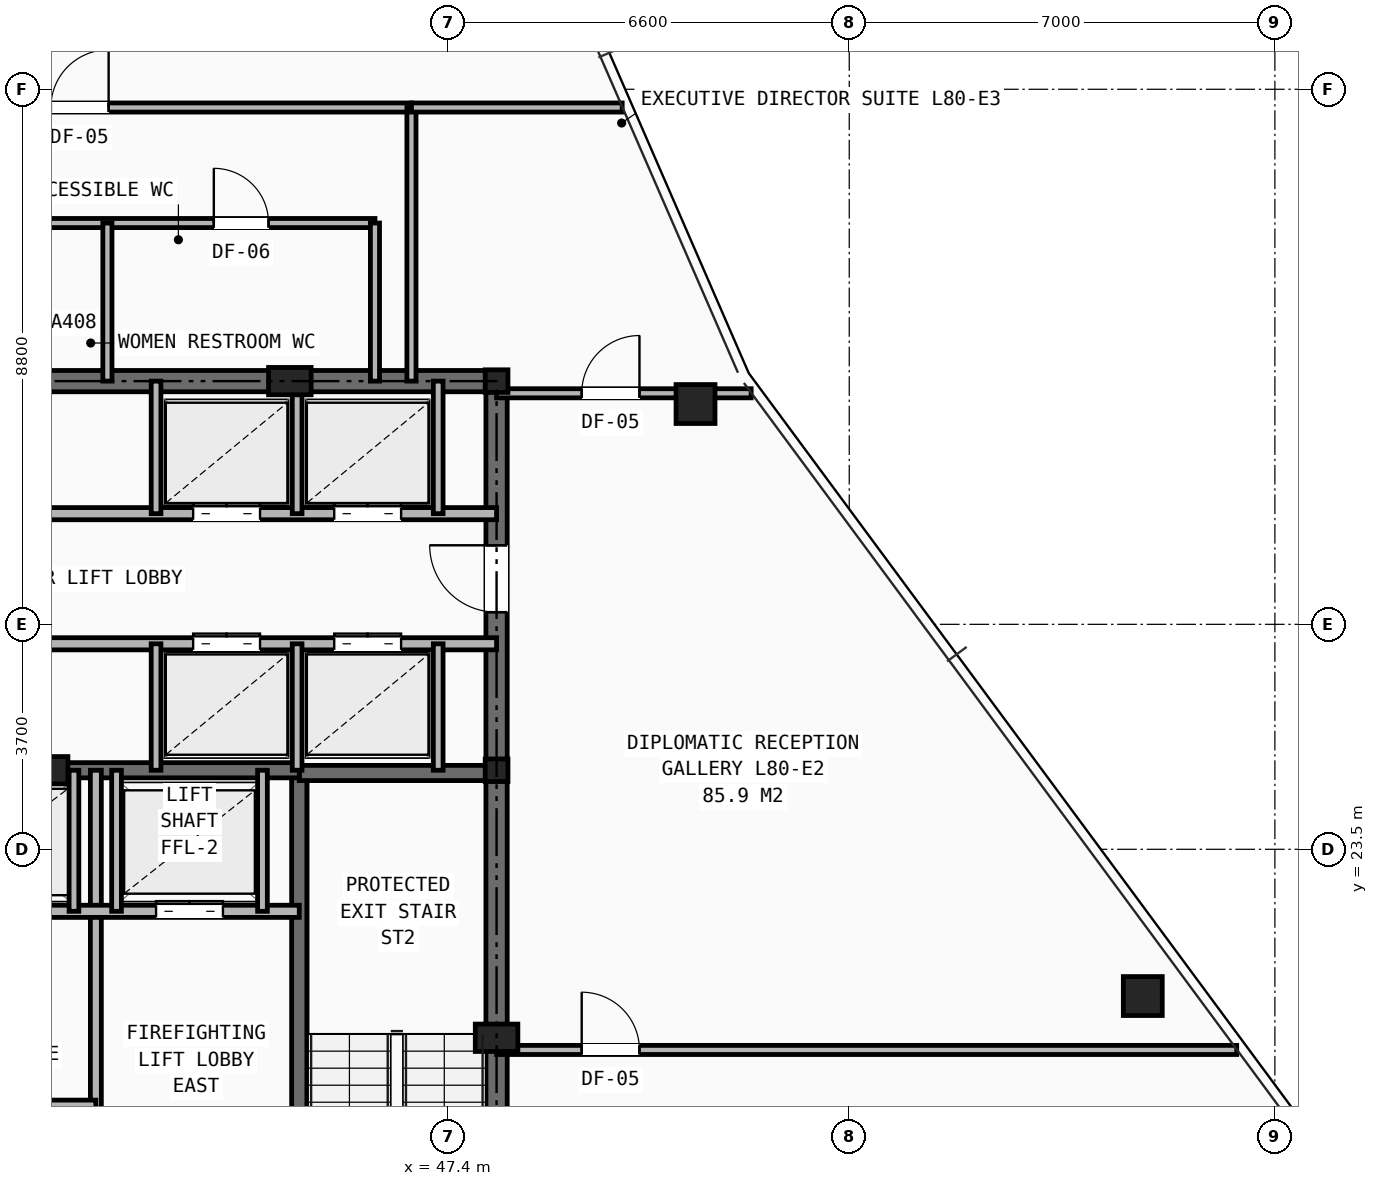
"""IFC4 building model, lengths in metres.
Left out: names, types, materials, properties, quantities, classifications, styles, units other than length and angle.
Written with IfcOpenShell. Run it as: python <this file> out.ifc"""

import sys

from ifc_helpers import new_model, si_unit, direction, frame, frame_2d, origin, origin_2d, place, context, subcontext, project, spatial, rectangle, hollow_rectangle, i_section, extrude, element, fill, save


model = new_model("IFC4")
c1 = context("Model", 3, precision=1e-05, world=origin(), true_north=direction((0.0, 1.0)))
c2 = subcontext(c1, "Body", "Model", "MODEL_VIEW")
j1 = project(units=[si_unit("LENGTHUNIT", "METRE"), si_unit("PLANEANGLEUNIT", "RADIAN")], contexts=[c1])
p1 = place(None, origin())
s1 = spatial("IfcSite", under=j1, at=p1, CompositionType="ELEMENT")
p2 = place(p1, origin())
s2 = spatial("IfcBuilding", under=s1, at=p2, CompositionType="ELEMENT")
p3 = place(p2, frame((0.0, 0.0, 283.0)))
s3 = spatial("IfcBuildingStorey", under=s2, at=p3, CompositionType="ELEMENT", Elevation=283.0)
for number, where, z_axis, x_axis in (
    (1, (48.2, 24.8, 0.0), (0.0, 0.0, 1.0), (1.0, 0.0, 0.0)),
    (2, (48.2, 31.2, 0.0), (0.0, 0.0, 1.0), (1.0, 0.0, 0.0)),
):
    element("IfcColumn", number, at=place(p3, frame(where, z_axis=z_axis, x_axis=x_axis)), inside=s3, PredefinedType="COLUMN", context=c2, shape_type="SweptSolid", body=[
        extrude(i_section(OverallWidth=0.374, OverallDepth=0.372, WebThickness=0.016, FlangeThickness=0.026, at=origin_2d()), origin(), (0.0, 0.0, 1.0), 3.5),
    ])
for number, where, z_axis, x_axis in (
    (3, (48.2, 20.4, 0.0), (0.0, 0.0, 1.0), (1.0, 0.0, 0.0)),
    (4, (44.8, 31.2, 0.0), (0.0, 0.0, 1.0), (1.0, 0.0, 0.0)),
    (5, (40.8, 24.8, 0.0), (0.0, 0.0, 1.0), (1.0, 0.0, 0.0)),
):
    element("IfcColumn", number, at=place(p3, frame(where, z_axis=z_axis, x_axis=x_axis)), inside=s3, PredefinedType="PILASTER", context=c2, shape_type="SweptSolid", body=[
        extrude(rectangle(XDim=0.7, YDim=0.45, at=origin_2d()), origin(), (0.0, 0.0, 1.0), 3.5),
    ])
for number, where, z_axis, x_axis in (
    (6, (58.827, 21.086, 0.0), (0.0, 0.0, 1.0), (1.0, 0.0, 0.0)),
    (7, (51.472, 30.823, 0.0), (0.0, 0.0, 1.0), (1.0, 0.0, 0.0)),
):
    element("IfcColumn", number, at=place(p3, frame(where, z_axis=z_axis, x_axis=x_axis)), inside=s3, PredefinedType="COLUMN", context=c2, shape_type="SweptSolid", body=[
        extrude(hollow_rectangle(XDim=0.64, YDim=0.64, WallThickness=0.045, at=origin_2d()), origin(), (0.0, 0.0, 1.0), 3.5),
    ])
p4 = place(p3, frame((31.8, 31.2, 0.0), z_axis=(0.0, 0.0, 1.0), x_axis=(1.0, 0.0, 0.0)))
e8 = element("IfcWall", 8, at=p4, inside=s3, PredefinedType="SHEAR", context=c2, shape_type="SweptSolid", body=[
    extrude(rectangle(XDim=16.4, YDim=0.35, at=frame_2d((8.2, 0.0))), origin(), (0.0, 0.0, 1.0), 3.25),
])
p5 = place(p3, frame((48.2, 16.4, 0.0), z_axis=(0.0, 0.0, 1.0), x_axis=(0.0, 1.0, 0.0)))
e9 = element("IfcWall", 9, at=p5, inside=s3, PredefinedType="SHEAR", context=c2, shape_type="SweptSolid", body=[
    extrude(rectangle(XDim=14.8, YDim=0.35, at=frame_2d((7.4, 0.0))), origin(), (0.0, 0.0, 1.0), 3.25),
])
p6 = place(p5, frame((11.0, 0.0, 0.0)))
e10 = element("IfcOpeningElement", 10, at=p6, cuts=e9, PredefinedType="OPENING", context=c2, shape_type="SweptSolid", body=[
    extrude(rectangle(XDim=1.1, YDim=2.15, at=frame_2d((0.55, 1.075))), frame((0.0, 0.185, 0.0), z_axis=(0.0, -1.0, 0.0), x_axis=(1.0, 0.0, 0.0)), (0.0, 0.0, 1.0), 0.37),
])
p7 = place(p3, frame((44.955, 16.4, 0.0), z_axis=(0.0, 0.0, 1.0), x_axis=(0.0, 1.0, 0.0)))
e11 = element("IfcWall", 11, at=p7, inside=s3, PredefinedType="SHEAR", context=c2, shape_type="SweptSolid", body=[
    extrude(rectangle(XDim=8.4, YDim=0.25, at=frame_2d((4.2, 0.0))), origin(), (0.0, 0.0, 1.0), 3.25),
])
p8 = place(p7, frame((0.45, 0.0, 0.0)))
e12 = element("IfcOpeningElement", 12, at=p8, cuts=e11, PredefinedType="OPENING", context=c2, shape_type="SweptSolid", body=[
    extrude(rectangle(XDim=0.95, YDim=2.1, at=frame_2d((0.475, 1.05))), frame((0.0, 0.135, 0.0), z_axis=(0.0, -1.0, 0.0), x_axis=(1.0, 0.0, 0.0)), (0.0, 0.0, 1.0), 0.27),
])
p9 = place(p3, frame((44.955, 24.755, 0.0), z_axis=(0.0, 0.0, 1.0), x_axis=(1.0, 0.0, 0.0)))
e13 = element("IfcWall", 13, at=p9, inside=s3, PredefinedType="SHEAR", context=c2, shape_type="SweptSolid", body=[
    extrude(rectangle(XDim=3.245, YDim=0.25, at=frame_2d((1.623, 0.0))), origin(), (0.0, 0.0, 1.0), 3.25),
])
p10 = place(p3, frame((35.045, 24.8, 0.0), z_axis=(0.0, 0.0, 1.0), x_axis=(1.0, 0.0, 0.0)))
e14 = element("IfcWall", 14, at=p10, inside=s3, PredefinedType="SHEAR", context=c2, shape_type="SweptSolid", body=[
    extrude(rectangle(XDim=9.91, YDim=0.25, at=frame_2d((4.955, 0.0))), origin(), (0.0, 0.0, 1.0), 3.25),
])
p11 = place(p3, frame((41.61, 16.4, 0.0), z_axis=(0.0, 0.0, 1.0), x_axis=(0.0, 1.0, 0.0)))
e15 = element("IfcWall", 15, at=p11, inside=s3, PredefinedType="PARTITIONING", context=c2, shape_type="SweptSolid", body=[
    extrude(rectangle(XDim=8.4, YDim=0.18, at=frame_2d((4.2, 0.0))), origin(), (0.0, 0.0, 1.0), 2.978),
])
p12 = place(p3, frame((35.045, 22.48, 0.0), z_axis=(0.0, 0.0, 1.0), x_axis=(1.0, 0.0, 0.0)))
e16 = element("IfcWall", 16, at=p12, inside=s3, PredefinedType="SOLIDWALL", context=c2, shape_type="SweptSolid", body=[
    extrude(rectangle(XDim=9.91, YDim=0.2, at=frame_2d((4.955, 0.0))), origin(), (0.0, 0.0, 1.0), 3.25),
])
p13 = place(p12, frame((1.255, 0.0, 0.0)))
e17 = element("IfcOpeningElement", 17, at=p13, cuts=e16, PredefinedType="OPENING", context=c2, shape_type="SweptSolid", body=[
    extrude(rectangle(XDim=1.1, YDim=2.15, at=frame_2d((0.55, 1.075))), frame((0.0, 0.11, 0.0), z_axis=(0.0, -1.0, 0.0), x_axis=(1.0, 0.0, 0.0)), (0.0, 0.0, 1.0), 0.22),
])
p14 = place(p12, frame((7.555, 0.0, 0.0)))
e18 = element("IfcOpeningElement", 18, at=p14, cuts=e16, PredefinedType="OPENING", context=c2, shape_type="SweptSolid", body=[
    extrude(rectangle(XDim=1.1, YDim=2.15, at=frame_2d((0.55, 1.075))), frame((0.0, 0.11, 0.0), z_axis=(0.0, -1.0, 0.0), x_axis=(1.0, 0.0, 0.0)), (0.0, 0.0, 1.0), 0.22),
])
p15 = place(p12, frame((4.405, 0.0, 0.0)))
e19 = element("IfcOpeningElement", 19, at=p15, cuts=e16, PredefinedType="OPENING", context=c2, shape_type="SweptSolid", body=[
    extrude(rectangle(XDim=1.1, YDim=2.15, at=frame_2d((0.55, 1.075))), frame((0.0, 0.11, 0.0), z_axis=(0.0, -1.0, 0.0), x_axis=(1.0, 0.0, 0.0)), (0.0, 0.0, 1.0), 0.22),
])
p16 = place(p3, frame((38.39, 19.3, 0.0), z_axis=(0.0, 0.0, 1.0), x_axis=(1.0, 0.0, 0.0)))
e20 = element("IfcWall", 20, at=p16, inside=s3, PredefinedType="PARTITIONING", context=c2, shape_type="SweptSolid", body=[
    extrude(rectangle(XDim=3.22, YDim=0.15, at=frame_2d((1.61, 0.0))), origin(), (0.0, 0.0, 1.0), 3.25),
])
for number, where, z_axis, x_axis in (
    (21, (41.95, 22.48, 0.0), (0.0, 0.0, 1.0), (0.0, 1.0, 0.0)),
    (22, (44.35, 22.48, 0.0), (0.0, 0.0, 1.0), (0.0, 1.0, 0.0)),
    (23, (41.25, 22.48, 0.0), (0.0, 0.0, 1.0), (0.0, 1.0, 0.0)),
):
    element("IfcWall", number, at=place(p3, frame(where, z_axis=z_axis, x_axis=x_axis)), inside=s3, PredefinedType="SOLIDWALL", context=c2, shape_type="SweptSolid", body=[
        extrude(rectangle(XDim=2.32, YDim=0.16, at=frame_2d((1.16, 0.0))), origin(), (0.0, 0.0, 1.0), 3.25),
    ])
p17 = place(p3, frame((31.8, 29.02, 0.0), z_axis=(0.0, 0.0, 1.0), x_axis=(1.0, 0.0, 0.0)))
e24 = element("IfcWall", 24, at=p17, inside=s3, PredefinedType="SOLIDWALL", context=c2, shape_type="SweptSolid", body=[
    extrude(rectangle(XDim=16.4, YDim=0.2, at=frame_2d((8.2, 0.0))), origin(), (0.0, 0.0, 1.0), 2.705),
])
p18 = place(p17, frame((0.55, 0.0, 0.0)))
e25 = element("IfcOpeningElement", 25, at=p18, cuts=e24, PredefinedType="OPENING", context=c2, shape_type="SweptSolid", body=[
    extrude(rectangle(XDim=0.85, YDim=2.05, at=frame_2d((0.425, 1.025))), frame((0.0, 0.11, 0.0), z_axis=(0.0, -1.0, 0.0), x_axis=(1.0, 0.0, 0.0)), (0.0, 0.0, 1.0), 0.22),
])
p19 = place(p17, frame((5.94, 0.0, 0.0)))
e26 = element("IfcOpeningElement", 26, at=p19, cuts=e24, PredefinedType="OPENING", context=c2, shape_type="SweptSolid", body=[
    extrude(rectangle(XDim=0.9, YDim=2.1, at=frame_2d((0.45, 1.05))), frame((0.0, 0.11, 0.0), z_axis=(0.0, -1.0, 0.0), x_axis=(1.0, 0.0, 0.0)), (0.0, 0.0, 1.0), 0.22),
])
p20 = place(p17, frame((11.41, 0.0, 0.0)))
e27 = element("IfcOpeningElement", 27, at=p20, cuts=e24, PredefinedType="OPENING", context=c2, shape_type="SweptSolid", body=[
    extrude(rectangle(XDim=1.1, YDim=2.15, at=frame_2d((0.55, 1.075))), frame((0.0, 0.11, 0.0), z_axis=(0.0, -1.0, 0.0), x_axis=(1.0, 0.0, 0.0)), (0.0, 0.0, 1.0), 0.22),
])
p21 = place(p17, frame((13.73, 0.0, 0.0)))
e28 = element("IfcOpeningElement", 28, at=p21, cuts=e24, PredefinedType="OPENING", context=c2, shape_type="SweptSolid", body=[
    extrude(rectangle(XDim=1.1, YDim=2.15, at=frame_2d((0.55, 1.075))), frame((0.0, 0.11, 0.0), z_axis=(0.0, -1.0, 0.0), x_axis=(1.0, 0.0, 0.0)), (0.0, 0.0, 1.0), 0.22),
])
p22 = place(p3, frame((33.82, 26.88, 0.0), z_axis=(0.0, 0.0, 1.0), x_axis=(1.0, 0.0, 0.0)))
e29 = element("IfcWall", 29, at=p22, inside=s3, PredefinedType="SOLIDWALL", context=c2, shape_type="SweptSolid", body=[
    extrude(rectangle(XDim=14.38, YDim=0.2, at=frame_2d((7.19, 0.0))), origin(), (0.0, 0.0, 1.0), 2.705),
])
p23 = place(p22, frame((3.92, 0.0, 0.0)))
e30 = element("IfcOpeningElement", 30, at=p23, cuts=e29, PredefinedType="OPENING", context=c2, shape_type="SweptSolid", body=[
    extrude(rectangle(XDim=0.9, YDim=2.1, at=frame_2d((0.45, 1.05))), frame((0.0, 0.11, 0.0), z_axis=(0.0, -1.0, 0.0), x_axis=(1.0, 0.0, 0.0)), (0.0, 0.0, 1.0), 0.22),
])
p24 = place(p22, frame((9.39, 0.0, 0.0)))
e31 = element("IfcOpeningElement", 31, at=p24, cuts=e29, PredefinedType="OPENING", context=c2, shape_type="SweptSolid", body=[
    extrude(rectangle(XDim=1.1, YDim=2.15, at=frame_2d((0.55, 1.075))), frame((0.0, 0.11, 0.0), z_axis=(0.0, -1.0, 0.0), x_axis=(1.0, 0.0, 0.0)), (0.0, 0.0, 1.0), 0.22),
])
p25 = place(p22, frame((11.71, 0.0, 0.0)))
e32 = element("IfcOpeningElement", 32, at=p25, cuts=e29, PredefinedType="OPENING", context=c2, shape_type="SweptSolid", body=[
    extrude(rectangle(XDim=1.1, YDim=2.15, at=frame_2d((0.55, 1.075))), frame((0.0, 0.11, 0.0), z_axis=(0.0, -1.0, 0.0), x_axis=(1.0, 0.0, 0.0)), (0.0, 0.0, 1.0), 0.22),
])
for number, where, z_axis, x_axis in (
    (33, (42.6, 29.02, 0.0), (0.0, 0.0, 1.0), (0.0, 1.0, 0.0)),
    (34, (44.92, 29.02, 0.0), (0.0, 0.0, 1.0), (0.0, 1.0, 0.0)),
    (35, (47.24, 29.02, 0.0), (0.0, 0.0, 1.0), (0.0, 1.0, 0.0)),
):
    element("IfcWall", number, at=place(p3, frame(where, z_axis=z_axis, x_axis=x_axis)), inside=s3, PredefinedType="SOLIDWALL", context=c2, shape_type="SweptSolid", body=[
        extrude(rectangle(XDim=2.18, YDim=0.16, at=frame_2d((1.09, 0.0))), origin(), (0.0, 0.0, 1.0), 2.978),
    ])
for number, where, z_axis, x_axis in (
    (36, (42.6, 24.8, 0.0), (0.0, 0.0, 1.0), (0.0, 1.0, 0.0)),
    (37, (44.92, 24.8, 0.0), (0.0, 0.0, 1.0), (0.0, 1.0, 0.0)),
    (38, (47.24, 24.8, 0.0), (0.0, 0.0, 1.0), (0.0, 1.0, 0.0)),
):
    element("IfcWall", number, at=place(p3, frame(where, z_axis=z_axis, x_axis=x_axis)), inside=s3, PredefinedType="SOLIDWALL", context=c2, shape_type="SweptSolid", body=[
        extrude(rectangle(XDim=2.08, YDim=0.16, at=frame_2d((1.04, 0.0))), origin(), (0.0, 0.0, 1.0), 3.25),
    ])
p26 = place(p3, frame((33.2, 33.8, 0.0), z_axis=(0.0, 0.0, 1.0), x_axis=(1.0, 0.0, 0.0)))
e39 = element("IfcWall", 39, at=p26, inside=s3, PredefinedType="PARTITIONING", context=c2, shape_type="SweptSolid", body=[
    extrude(rectangle(XDim=13.0, YDim=0.15, at=frame_2d((6.5, 0.0))), origin(), (0.0, 0.0, 1.0), 3.25),
])
p27 = place(p26, frame((1.7, 0.0, 0.0)))
e40 = element("IfcOpeningElement", 40, at=p27, cuts=e39, PredefinedType="OPENING", context=c2, shape_type="SweptSolid", body=[
    extrude(rectangle(XDim=0.9, YDim=2.1, at=frame_2d((0.45, 1.05))), frame((0.0, 0.085, 0.0), z_axis=(0.0, -1.0, 0.0), x_axis=(1.0, 0.0, 0.0)), (0.0, 0.0, 1.0), 0.17),
])
p28 = place(p26, frame((6.0, 0.0, 0.0)))
e41 = element("IfcOpeningElement", 41, at=p28, cuts=e39, PredefinedType="OPENING", context=c2, shape_type="SweptSolid", body=[
    extrude(rectangle(XDim=0.9, YDim=2.1, at=frame_2d((0.45, 1.05))), frame((0.0, 0.085, 0.0), z_axis=(0.0, -1.0, 0.0), x_axis=(1.0, 0.0, 0.0)), (0.0, 0.0, 1.0), 0.17),
])
p29 = place(p26, frame((10.35, 0.0, 0.0)))
e42 = element("IfcOpeningElement", 42, at=p29, cuts=e39, PredefinedType="OPENING", context=c2, shape_type="SweptSolid", body=[
    extrude(rectangle(XDim=0.9, YDim=2.1, at=frame_2d((0.45, 1.05))), frame((0.0, 0.085, 0.0), z_axis=(0.0, -1.0, 0.0), x_axis=(1.0, 0.0, 0.0)), (0.0, 0.0, 1.0), 0.17),
])
for number, where, z_axis, x_axis in (
    (43, (46.2, 31.2, 0.0), (0.0, 0.0, 1.0), (0.0, 1.0, 0.0)),
    (44, (41.8, 31.2, 0.0), (0.0, 0.0, 1.0), (0.0, 1.0, 0.0)),
):
    element("IfcWall", number, at=place(p3, frame(where, z_axis=z_axis, x_axis=x_axis)), inside=s3, PredefinedType="PARTITIONING", context=c2, shape_type="SweptSolid", body=[
        extrude(rectangle(XDim=2.6, YDim=0.15, at=frame_2d((1.3, 0.0))), origin(), (0.0, 0.0, 1.0), 2.978),
    ])
p30 = place(p3, frame((40.75, 35.7, 0.0), z_axis=(0.0, 0.0, 1.0), x_axis=(1.0, 0.0, 0.0)))
e45 = element("IfcWall", 45, at=p30, inside=s3, PredefinedType="PARTITIONING", context=c2, shape_type="SweptSolid", body=[
    extrude(rectangle(XDim=6.05, YDim=0.15, at=frame_2d((3.025, 0.0))), origin(), (0.0, 0.0, 1.0), 3.25),
])
p31 = place(p30, frame((0.12, 0.0, 0.0)))
e46 = element("IfcOpeningElement", 46, at=p31, cuts=e45, PredefinedType="OPENING", context=c2, shape_type="SweptSolid", body=[
    extrude(rectangle(XDim=0.95, YDim=2.1, at=frame_2d((0.475, 1.05))), frame((0.0, 0.085, 0.0), z_axis=(0.0, -1.0, 0.0), x_axis=(1.0, 0.0, 0.0)), (0.0, 0.0, 1.0), 0.17),
])
p32 = place(p3, frame((46.8, 31.2, 0.0), z_axis=(0.0, 0.0, 1.0), x_axis=(0.0, 1.0, 0.0)))
e47 = element("IfcWall", 47, at=p32, inside=s3, PredefinedType="PARTITIONING", context=c2, shape_type="SweptSolid", body=[
    extrude(rectangle(XDim=4.5, YDim=0.15, at=frame_2d((2.25, 0.0))), origin(), (0.0, 0.0, 1.0), 2.978),
])
p33 = place(p3, frame((46.8, 35.7, 0.0), z_axis=(0.0, 0.0, 1.0), x_axis=(1.0, 0.0, 0.0)))
e48 = element("IfcWall", 48, at=p33, inside=s3, PredefinedType="PARTITIONING", context=c2, shape_type="SweptSolid", body=[
    extrude(rectangle(XDim=3.466, YDim=0.15, at=frame_2d((1.733, 0.0))), origin(), (0.0, 0.0, 1.0), 2.628),
])
p34 = place(p3, frame((48.2, 20.2, 0.0), z_axis=(0.0, 0.0, 1.0), x_axis=(1.0, 0.0, 0.0)))
e49 = element("IfcWall", 49, at=p34, inside=s3, PredefinedType="PARTITIONING", context=c2, shape_type="SweptSolid", body=[
    extrude(rectangle(XDim=12.172, YDim=0.15, at=frame_2d((6.086, 0.0))), origin(), (0.0, 0.0, 1.0), 2.265),
])
p35 = place(p34, frame((1.4, 0.0, 0.0)))
e50 = element("IfcOpeningElement", 50, at=p35, cuts=e49, PredefinedType="OPENING", context=c2, shape_type="SweptSolid", body=[
    extrude(rectangle(XDim=0.95, YDim=2.1, at=frame_2d((0.475, 1.05))), frame((0.0, 0.085, 0.0), z_axis=(0.0, -1.0, 0.0), x_axis=(1.0, 0.0, 0.0)), (0.0, 0.0, 1.0), 0.17),
])
p36 = place(p3, frame((48.2, 31.0, 0.0), z_axis=(0.0, 0.0, 1.0), x_axis=(1.0, 0.0, 0.0)))
e51 = element("IfcWall", 51, at=p36, inside=s3, PredefinedType="PARTITIONING", context=c2, shape_type="SweptSolid", body=[
    extrude(rectangle(XDim=4.187, YDim=0.15, at=frame_2d((2.093, 0.0))), origin(), (0.0, 0.0, 1.0), 2.265),
])
p37 = place(p36, frame((1.4, 0.0, 0.0)))
e52 = element("IfcOpeningElement", 52, at=p37, cuts=e51, PredefinedType="OPENING", context=c2, shape_type="SweptSolid", body=[
    extrude(rectangle(XDim=0.95, YDim=2.1, at=frame_2d((0.475, 1.05))), frame((0.0, 0.085, 0.0), z_axis=(0.0, -1.0, 0.0), x_axis=(1.0, 0.0, 0.0)), (0.0, 0.0, 1.0), 0.17),
])
p38 = place(p14, origin())
e53 = element("IfcDoor", 53, at=p38, inside=s3, OperationType="DOUBLE_DOOR_SLIDING", PredefinedType="DOOR", context=c2, shape_type="SweptSolid", body=[
    extrude(rectangle(XDim=1.1, YDim=2.15, at=frame_2d((0.55, 1.075))), frame((0.0, 0.025, 0.0), z_axis=(0.0, -1.0, 0.0), x_axis=(1.0, 0.0, 0.0)), (0.0, 0.0, 1.0), 0.05),
])
fill(e18, e53)
p39 = place(p6, origin())
e54 = element("IfcDoor", 54, at=p39, inside=s3, OperationType="SINGLE_SWING_RIGHT", PredefinedType="DOOR", context=c2, shape_type="SweptSolid", body=[
    extrude(rectangle(XDim=1.1, YDim=2.15, at=frame_2d((0.55, 1.075))), frame((0.0, 0.025, 0.0), z_axis=(0.0, -1.0, 0.0), x_axis=(1.0, 0.0, 0.0)), (0.0, 0.0, 1.0), 0.05),
])
fill(e10, e54)
p40 = place(p20, origin())
e55 = element("IfcDoor", 55, at=p40, inside=s3, OperationType="DOUBLE_DOOR_SLIDING", PredefinedType="DOOR", context=c2, shape_type="SweptSolid", body=[
    extrude(rectangle(XDim=1.1, YDim=2.15, at=frame_2d((0.55, 1.075))), frame((0.0, 0.025, 0.0), z_axis=(0.0, -1.0, 0.0), x_axis=(1.0, 0.0, 0.0)), (0.0, 0.0, 1.0), 0.05),
])
fill(e27, e55)
p41 = place(p21, origin())
e56 = element("IfcDoor", 56, at=p41, inside=s3, OperationType="DOUBLE_DOOR_SLIDING", PredefinedType="DOOR", context=c2, shape_type="SweptSolid", body=[
    extrude(rectangle(XDim=1.1, YDim=2.15, at=frame_2d((0.55, 1.075))), frame((0.0, 0.025, 0.0), z_axis=(0.0, -1.0, 0.0), x_axis=(1.0, 0.0, 0.0)), (0.0, 0.0, 1.0), 0.05),
])
fill(e28, e56)
p42 = place(p24, origin())
e57 = element("IfcDoor", 57, at=p42, inside=s3, OperationType="DOUBLE_DOOR_SLIDING", PredefinedType="DOOR", context=c2, shape_type="SweptSolid", body=[
    extrude(rectangle(XDim=1.1, YDim=2.15, at=frame_2d((0.55, 1.075))), frame((0.0, 0.025, 0.0), z_axis=(0.0, -1.0, 0.0), x_axis=(1.0, 0.0, 0.0)), (0.0, 0.0, 1.0), 0.05),
])
fill(e31, e57)
p43 = place(p25, origin())
e58 = element("IfcDoor", 58, at=p43, inside=s3, OperationType="DOUBLE_DOOR_SLIDING", PredefinedType="DOOR", context=c2, shape_type="SweptSolid", body=[
    extrude(rectangle(XDim=1.1, YDim=2.15, at=frame_2d((0.55, 1.075))), frame((0.0, 0.025, 0.0), z_axis=(0.0, -1.0, 0.0), x_axis=(1.0, 0.0, 0.0)), (0.0, 0.0, 1.0), 0.05),
])
fill(e32, e58)
p44 = place(p29, origin())
e59 = element("IfcDoor", 59, at=p44, inside=s3, OperationType="SINGLE_SWING_LEFT", PredefinedType="DOOR", context=c2, shape_type="SweptSolid", body=[
    extrude(rectangle(XDim=0.9, YDim=2.1, at=frame_2d((0.45, 1.05))), frame((0.0, 0.025, 0.0), z_axis=(0.0, -1.0, 0.0), x_axis=(1.0, 0.0, 0.0)), (0.0, 0.0, 1.0), 0.05),
])
fill(e42, e59)
p45 = place(p35, origin())
e60 = element("IfcDoor", 60, at=p45, inside=s3, OperationType="SINGLE_SWING_LEFT", PredefinedType="DOOR", context=c2, shape_type="SweptSolid", body=[
    extrude(rectangle(XDim=0.95, YDim=2.1, at=frame_2d((0.475, 1.05))), frame((0.0, 0.025, 0.0), z_axis=(0.0, -1.0, 0.0), x_axis=(1.0, 0.0, 0.0)), (0.0, 0.0, 1.0), 0.05),
])
fill(e50, e60)
p46 = place(p37, origin())
e61 = element("IfcDoor", 61, at=p46, inside=s3, OperationType="SINGLE_SWING_RIGHT", PredefinedType="DOOR", context=c2, shape_type="SweptSolid", body=[
    extrude(rectangle(XDim=0.95, YDim=2.1, at=frame_2d((0.475, 1.05))), frame((0.0, 0.025, 0.0), z_axis=(0.0, -1.0, 0.0), x_axis=(1.0, 0.0, 0.0)), (0.0, 0.0, 1.0), 0.05),
])
fill(e52, e61)
p47 = place(p31, origin())
e62 = element("IfcDoor", 62, at=p47, inside=s3, OperationType="SINGLE_SWING_RIGHT", PredefinedType="DOOR", context=c2, shape_type="SweptSolid", body=[
    extrude(rectangle(XDim=0.95, YDim=2.1, at=frame_2d((0.475, 1.05))), frame((0.0, 0.025, 0.0), z_axis=(0.0, -1.0, 0.0), x_axis=(1.0, 0.0, 0.0)), (0.0, 0.0, 1.0), 0.05),
])
fill(e46, e62)
save(model, sys.argv[1])
